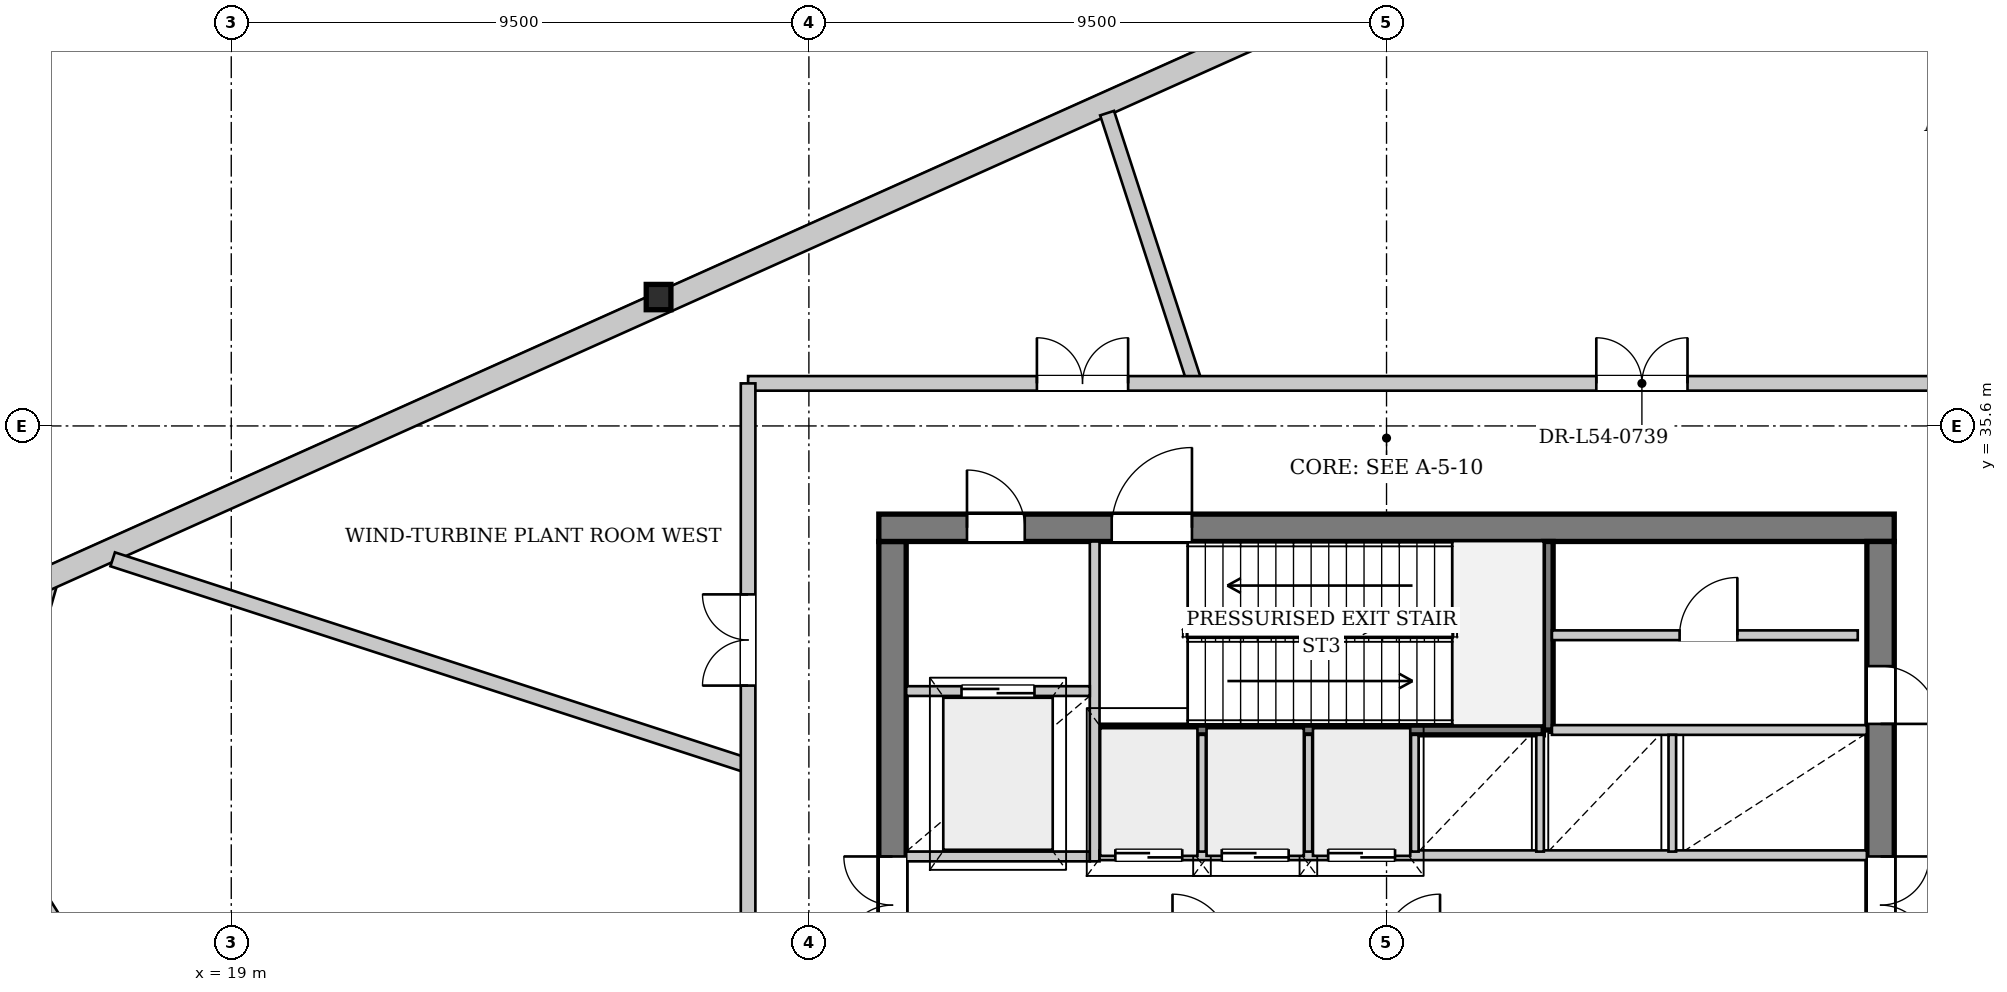
"""IFC4 building model, lengths in metres.
Left out: names, types, materials, properties, quantities, classifications, styles, units other than length and angle.
Written with IfcOpenShell. Run it as: python <this file> out.ifc"""

import sys

from ifc_helpers import new_model, si_unit, direction, frame, frame_2d, origin, origin_2d, place, context, subcontext, project, spatial, rectangle, i_section, extrude, source, transform, mapped, element, fill, save


model = new_model("IFC4")
c1 = context("Model", 3, precision=1e-05, world=origin(), true_north=direction((0.0, 1.0)))
c2 = subcontext(c1, "Body", "Model", "MODEL_VIEW")
j1 = project(units=[si_unit("LENGTHUNIT", "METRE"), si_unit("PLANEANGLEUNIT", "RADIAN")], contexts=[c1])
p1 = place(None, origin())
s1 = spatial("IfcSite", under=j1, at=p1, CompositionType="ELEMENT")
p2 = place(p1, origin())
s2 = spatial("IfcBuilding", under=s1, at=p2, CompositionType="ELEMENT")
p3 = place(p2, frame((0.0, 0.0, 204.3)))
s3 = spatial("IfcBuildingStorey", under=s2, at=p3, CompositionType="ELEMENT", Elevation=204.3)
m1 = source(origin(), c2, "Body", "SweptSolid", [
    extrude(i_section(OverallWidth=0.406, OverallDepth=0.416, WebThickness=0.027, FlangeThickness=0.042, at=origin_2d()), origin(), (0.0, 0.0, 1.0), 5.143),
])
p4 = place(p3, frame((26.104, 37.842, 0.0), z_axis=(-0.0297632018, -0.047659098256, 0.998420133096), x_axis=(0.848188094291, -0.529695154502, 0.0)))
e1 = element("IfcColumn", 1, at=p4, inside=s3, PredefinedType="COLUMN", context=c2, shape_type="MappedRepresentation", body=[
    mapped(m1, transform((0.0, 0.0, 0.0), x_axis=(1.0, 0.0, 0.0), y_axis=(0.0, 1.0, 0.0), z_axis=(0.0, 0.0, 1.0), scale=1.0)),
])
p5 = place(p3, frame((24.242, 14.344, 0.0), z_axis=(0.0, 0.0, 1.0), x_axis=(-0.531419317525, 0.847108912101, 0.0)))
e2 = element("IfcWall", 2, at=p5, inside=s3, PredefinedType="SOLIDWALL", context=c2, shape_type="SweptSolid", body=[
    extrude(rectangle(XDim=17.712, YDim=0.38, at=frame_2d((8.856, 0.0))), origin(), (0.0, 0.0, 1.0), 4.572),
])
p6 = place(p3, frame((14.851, 29.194, 0.0), z_axis=(0.0, 0.0, 1.0), x_axis=(0.27564088165, 0.961260684915, 0.0)))
e3 = element("IfcWall", 3, at=p6, inside=s3, PredefinedType="SOLIDWALL", context=c2, shape_type="SweptSolid", body=[
    extrude(rectangle(XDim=4.136, YDim=0.38, at=frame_2d((2.068, 0.0))), origin(), (0.0, 0.0, 1.0), 4.572),
])
p7 = place(p3, frame((15.886, 33.05, 0.0), z_axis=(0.0, 0.0, 1.0), x_axis=(0.912383830261, 0.409335737845, 0.0)))
e4 = element("IfcWall", 4, at=p7, inside=s3, PredefinedType="SOLIDWALL", context=c2, shape_type="SweptSolid", body=[
    extrude(rectangle(XDim=22.569, YDim=0.38, at=frame_2d((11.284, 0.0))), origin(), (0.0, 0.0, 1.0), 4.572),
])
p8 = place(p3, frame((29.875, 19.5, 0.0), z_axis=(0.0, 0.0, 1.0), x_axis=(0.0, 1.0, 0.0)))
e5 = element("IfcWall", 5, at=p8, inside=s3, PredefinedType="SHEAR", context=c2, shape_type="SweptSolid", body=[
    extrude(rectangle(XDim=14.2, YDim=0.45, at=frame_2d((7.1, 0.0))), origin(), (0.0, 0.0, 1.0), 5.08),
])
p9 = place(p8, frame((7.42, 0.0, 0.0)))
e6 = element("IfcOpeningElement", 6, at=p9, cuts=e5, PredefinedType="OPENING", context=c2, shape_type="SweptSolid", body=[
    extrude(rectangle(XDim=1.6, YDim=2.2, at=frame_2d((0.8, 1.1))), frame((0.0, 0.235, 0.0), z_axis=(0.0, -1.0, 0.0), x_axis=(1.0, 0.0, 0.0)), (0.0, 0.0, 1.0), 0.47),
])
p10 = place(p3, frame((29.65, 33.925, 0.0), z_axis=(0.0, 0.0, 1.0), x_axis=(1.0, 0.0, 0.0)))
e7 = element("IfcWall", 7, at=p10, inside=s3, PredefinedType="SHEAR", context=c2, shape_type="SweptSolid", body=[
    extrude(rectangle(XDim=16.7, YDim=0.45, at=frame_2d((8.35, 0.0))), origin(), (0.0, 0.0, 1.0), 5.08),
])
p11 = place(p10, frame((1.45, 0.0, 0.0)))
e8 = element("IfcOpeningElement", 8, at=p11, cuts=e7, PredefinedType="OPENING", context=c2, shape_type="SweptSolid", body=[
    extrude(rectangle(XDim=0.95, YDim=2.1, at=frame_2d((0.475, 1.05))), frame((0.0, 0.235, 0.0), z_axis=(0.0, -1.0, 0.0), x_axis=(1.0, 0.0, 0.0)), (0.0, 0.0, 1.0), 0.47),
])
p12 = place(p10, frame((3.83, 0.0, 0.0)))
e9 = element("IfcOpeningElement", 9, at=p12, cuts=e7, PredefinedType="OPENING", context=c2, shape_type="SweptSolid", body=[
    extrude(rectangle(XDim=1.32, YDim=2.2, at=frame_2d((0.66, 1.1))), frame((0.0, 0.235, 0.0), z_axis=(0.0, -1.0, 0.0), x_axis=(1.0, 0.0, 0.0)), (0.0, 0.0, 1.0), 0.47),
])
p13 = place(p3, frame((46.125, 33.7, 0.0), z_axis=(0.0, 0.0, 1.0), x_axis=(0.0, -1.0, 0.0)))
e10 = element("IfcWall", 10, at=p13, inside=s3, PredefinedType="SHEAR", context=c2, shape_type="SweptSolid", body=[
    extrude(rectangle(XDim=14.2, YDim=0.45, at=frame_2d((7.1, 0.0))), origin(), (0.0, 0.0, 1.0), 5.08),
])
p14 = place(p13, frame((5.18, 0.0, 0.0)))
e11 = element("IfcOpeningElement", 11, at=p14, cuts=e10, PredefinedType="OPENING", context=c2, shape_type="SweptSolid", body=[
    extrude(rectangle(XDim=1.6, YDim=2.2, at=frame_2d((0.8, 1.1))), frame((0.0, 0.235, 0.0), z_axis=(0.0, -1.0, 0.0), x_axis=(1.0, 0.0, 0.0)), (0.0, 0.0, 1.0), 0.47),
])
p15 = place(p13, frame((2.05, 0.0, 0.0)))
e12 = element("IfcOpeningElement", 12, at=p15, cuts=e10, PredefinedType="OPENING", context=c2, shape_type="SweptSolid", body=[
    extrude(rectangle(XDim=0.95, YDim=2.1, at=frame_2d((0.475, 1.05))), frame((0.0, 0.235, 0.0), z_axis=(0.0, -1.0, 0.0), x_axis=(1.0, 0.0, 0.0)), (0.0, 0.0, 1.0), 0.47),
])
p16 = place(p3, frame((33.28, 30.6, 0.0), z_axis=(0.0, 0.0, 1.0), x_axis=(1.0, 0.0, 0.0)))
e13 = element("IfcWall", 13, at=p16, inside=s3, PredefinedType="PARTITIONING", context=c2, shape_type="SweptSolid", body=[
    extrude(rectangle(XDim=7.3, YDim=0.16, at=frame_2d((3.65, 0.0))), origin(), (0.0, 0.0, 1.0), 5.08),
])
p17 = place(p3, frame((40.66, 30.6, 0.0), z_axis=(0.0, 0.0, 1.0), x_axis=(0.0, 1.0, 0.0)))
e14 = element("IfcWall", 14, at=p17, inside=s3, PredefinedType="PARTITIONING", context=c2, shape_type="SweptSolid", body=[
    extrude(rectangle(XDim=3.1, YDim=0.16, at=frame_2d((1.55, 0.0))), origin(), (0.0, 0.0, 1.0), 5.08),
])
p18 = place(p3, frame((30.1, 28.52, 0.0), z_axis=(0.0, 0.0, 1.0), x_axis=(1.0, 0.0, 0.0)))
e15 = element("IfcWall", 15, at=p18, inside=s3, PredefinedType="PARTITIONING", context=c2, shape_type="SweptSolid", body=[
    extrude(rectangle(XDim=3.02, YDim=0.16, at=frame_2d((1.51, 0.0))), origin(), (0.0, 0.0, 1.0), 5.08),
])
p19 = place(p3, frame((33.2, 28.44, 0.0), z_axis=(0.0, 0.0, 1.0), x_axis=(0.0, 1.0, 0.0)))
e16 = element("IfcWall", 16, at=p19, inside=s3, PredefinedType="PARTITIONING", context=c2, shape_type="SweptSolid", body=[
    extrude(rectangle(XDim=5.26, YDim=0.16, at=frame_2d((2.63, 0.0))), origin(), (0.0, 0.0, 1.0), 5.08),
])
p20 = place(p3, frame((30.1, 31.24, 0.0), z_axis=(0.0, 0.0, 1.0), x_axis=(1.0, 0.0, 0.0)))
e17 = element("IfcWall", 17, at=p20, inside=s3, PredefinedType="PARTITIONING", context=c2, shape_type="SweptSolid", body=[
    extrude(rectangle(XDim=3.02, YDim=0.16, at=frame_2d((1.51, 0.0))), origin(), (0.0, 0.0, 1.0), 5.08),
])
p21 = place(p20, frame((0.91, 0.0, 0.0)))
e18 = element("IfcOpeningElement", 18, at=p21, cuts=e17, PredefinedType="OPENING", context=c2, shape_type="SweptSolid", body=[
    extrude(rectangle(XDim=1.2, YDim=2.2, at=frame_2d((0.6, 1.1))), frame((0.0, 0.09, 0.0), z_axis=(0.0, -1.0, 0.0), x_axis=(1.0, 0.0, 0.0)), (0.0, 0.0, 1.0), 0.18),
])
p22 = place(p3, frame((33.28, 28.54, 0.0), z_axis=(0.0, 0.0, 1.0), x_axis=(1.0, 0.0, 0.0)))
e19 = element("IfcWall", 19, at=p22, inside=s3, PredefinedType="PARTITIONING", context=c2, shape_type="SweptSolid", body=[
    extrude(rectangle(XDim=12.62, YDim=0.16, at=frame_2d((6.31, 0.0))), origin(), (0.0, 0.0, 1.0), 5.08),
])
p23 = place(p22, frame((0.26, 0.0, 0.0)))
e20 = element("IfcOpeningElement", 20, at=p23, cuts=e19, PredefinedType="OPENING", context=c2, shape_type="SweptSolid", body=[
    extrude(rectangle(XDim=1.1, YDim=2.2, at=frame_2d((0.55, 1.1))), frame((0.0, 0.09, 0.0), z_axis=(0.0, -1.0, 0.0), x_axis=(1.0, 0.0, 0.0)), (0.0, 0.0, 1.0), 0.18),
])
p24 = place(p22, frame((2.01, 0.0, 0.0)))
e21 = element("IfcOpeningElement", 21, at=p24, cuts=e19, PredefinedType="OPENING", context=c2, shape_type="SweptSolid", body=[
    extrude(rectangle(XDim=1.1, YDim=2.2, at=frame_2d((0.55, 1.1))), frame((0.0, 0.09, 0.0), z_axis=(0.0, -1.0, 0.0), x_axis=(1.0, 0.0, 0.0)), (0.0, 0.0, 1.0), 0.18),
])
p25 = place(p22, frame((3.76, 0.0, 0.0)))
e22 = element("IfcOpeningElement", 22, at=p25, cuts=e19, PredefinedType="OPENING", context=c2, shape_type="SweptSolid", body=[
    extrude(rectangle(XDim=1.1, YDim=2.2, at=frame_2d((0.55, 1.1))), frame((0.0, 0.09, 0.0), z_axis=(0.0, -1.0, 0.0), x_axis=(1.0, 0.0, 0.0)), (0.0, 0.0, 1.0), 0.18),
])
p26 = place(p3, frame((40.72, 30.6, 0.0), z_axis=(0.0, 0.0, 1.0), x_axis=(1.0, 0.0, 0.0)))
e23 = element("IfcWall", 23, at=p26, inside=s3, PredefinedType="PARTITIONING", context=c2, shape_type="SweptSolid", body=[
    extrude(rectangle(XDim=5.18, YDim=0.16, at=frame_2d((2.59, 0.0))), origin(), (0.0, 0.0, 1.0), 5.08),
])
for number, where, z_axis, x_axis in (
    (24, (34.965, 28.6, 0.0), (0.0, 0.0, 1.0), (0.0, 1.0, 0.0)),
    (25, (36.715, 28.6, 0.0), (0.0, 0.0, 1.0), (0.0, 1.0, 0.0)),
    (26, (38.465, 28.6, 0.0), (0.0, 0.0, 1.0), (0.0, 1.0, 0.0)),
    (27, (40.525, 28.6, 0.0), (0.0, 0.0, 1.0), (0.0, 1.0, 0.0)),
    (28, (42.7, 28.6, 0.0), (0.0, 0.0, 1.0), (0.0, 1.0, 0.0)),
):
    element("IfcWall", number, at=place(p3, frame(where, z_axis=z_axis, x_axis=x_axis)), inside=s3, PredefinedType="PARTITIONING", context=c2, shape_type="SweptSolid", body=[
        extrude(rectangle(XDim=1.92, YDim=0.125, at=frame_2d((0.96, 0.0))), origin(), (0.0, 0.0, 1.0), 5.08),
    ])
p27 = place(p3, frame((40.72, 32.158, 0.0), z_axis=(0.0, 0.0, 1.0), x_axis=(1.0, 0.0, 0.0)))
e29 = element("IfcWall", 29, at=p27, inside=s3, PredefinedType="PARTITIONING", context=c2, shape_type="SweptSolid", body=[
    extrude(rectangle(XDim=5.03, YDim=0.16, at=frame_2d((2.515, 0.0))), origin(), (0.0, 0.0, 1.0), 5.08),
])
p28 = place(p27, frame((2.1, 0.0, 0.0)))
e30 = element("IfcOpeningElement", 30, at=p28, cuts=e29, PredefinedType="OPENING", context=c2, shape_type="SweptSolid", body=[
    extrude(rectangle(XDim=0.95, YDim=2.1, at=frame_2d((0.475, 1.05))), frame((0.0, 0.09, 0.0), z_axis=(0.0, -1.0, 0.0), x_axis=(1.0, 0.0, 0.0)), (0.0, 0.0, 1.0), 0.18),
])
p29 = place(p3, frame((34.848, 36.3, 0.0), z_axis=(0.0, 0.0, 1.0), x_axis=(-0.309024642633, 0.951054031191, 0.0)))
e31 = element("IfcWall", 31, at=p29, inside=s3, PredefinedType="PARTITIONING", context=c2, shape_type="SweptSolid", body=[
    extrude(rectangle(XDim=4.673, YDim=0.24, at=frame_2d((2.336, 0.0))), origin(), (0.0, 0.0, 1.0), 5.08),
])
p30 = place(p3, frame((27.5, 30.012, 0.0), z_axis=(0.0, 0.0, 1.0), x_axis=(-0.951062149422, 0.308999656855, 0.0)))
e32 = element("IfcWall", 32, at=p30, inside=s3, PredefinedType="PARTITIONING", context=c2, shape_type="SweptSolid", body=[
    extrude(rectangle(XDim=10.988, YDim=0.24, at=frame_2d((5.494, 0.0))), origin(), (0.0, 0.0, 1.0), 5.08),
])
p31 = place(p3, frame((27.5, 36.3, 0.0), z_axis=(0.0, 0.0, 1.0), x_axis=(1.0, 0.0, 0.0)))
e33 = element("IfcWall", 33, at=p31, inside=s3, PredefinedType="PARTITIONING", context=c2, shape_type="SweptSolid", body=[
    extrude(rectangle(XDim=21.0, YDim=0.24, at=frame_2d((10.5, 0.0))), origin(), (0.0, 0.0, 1.0), 5.08),
])
p32 = place(p31, frame((4.75, 0.0, 0.0)))
e34 = element("IfcOpeningElement", 34, at=p32, cuts=e33, PredefinedType="OPENING", context=c2, shape_type="SweptSolid", body=[
    extrude(rectangle(XDim=1.5, YDim=2.25, at=frame_2d((0.75, 1.125))), frame((0.0, 0.13, 0.0), z_axis=(0.0, -1.0, 0.0), x_axis=(1.0, 0.0, 0.0)), (0.0, 0.0, 1.0), 0.26),
])
p33 = place(p31, frame((13.95, 0.0, 0.0)))
e35 = element("IfcOpeningElement", 35, at=p33, cuts=e33, PredefinedType="OPENING", context=c2, shape_type="SweptSolid", body=[
    extrude(rectangle(XDim=1.5, YDim=2.25, at=frame_2d((0.75, 1.125))), frame((0.0, 0.13, 0.0), z_axis=(0.0, -1.0, 0.0), x_axis=(1.0, 0.0, 0.0)), (0.0, 0.0, 1.0), 0.26),
])
p34 = place(p3, frame((27.5, 16.9, 0.0), z_axis=(0.0, 0.0, 1.0), x_axis=(0.0, 1.0, 0.0)))
e36 = element("IfcWall", 36, at=p34, inside=s3, PredefinedType="PARTITIONING", context=c2, shape_type="SweptSolid", body=[
    extrude(rectangle(XDim=19.4, YDim=0.24, at=frame_2d((9.7, 0.0))), origin(), (0.0, 0.0, 1.0), 5.08),
])
p35 = place(p34, frame((5.07, 0.0, 0.0)))
e37 = element("IfcOpeningElement", 37, at=p35, cuts=e36, PredefinedType="OPENING", context=c2, shape_type="SweptSolid", body=[
    extrude(rectangle(XDim=1.5, YDim=2.25, at=frame_2d((0.75, 1.125))), frame((0.0, 0.13, 0.0), z_axis=(0.0, -1.0, 0.0), x_axis=(1.0, 0.0, 0.0)), (0.0, 0.0, 1.0), 0.26),
])
p36 = place(p34, frame((14.43, 0.0, 0.0)))
e38 = element("IfcOpeningElement", 38, at=p36, cuts=e36, PredefinedType="OPENING", context=c2, shape_type="SweptSolid", body=[
    extrude(rectangle(XDim=1.5, YDim=2.25, at=frame_2d((0.75, 1.125))), frame((0.0, 0.13, 0.0), z_axis=(0.0, -1.0, 0.0), x_axis=(1.0, 0.0, 0.0)), (0.0, 0.0, 1.0), 0.26),
])
m2 = source(origin(), c2, "Body", "SweptSolid", [
    extrude(rectangle(XDim=1.6, YDim=2.2, at=frame_2d((0.8, 1.1))), frame((0.0, 0.025, 0.0), z_axis=(0.0, -1.0, 0.0), x_axis=(1.0, 0.0, 0.0)), (0.0, 0.0, 1.0), 0.05),
])
p37 = place(p9, origin())
e39 = element("IfcDoor", 39, at=p37, inside=s3, OperationType="DOUBLE_DOOR_SINGLE_SWING", PredefinedType="DOOR", context=c2, shape_type="MappedRepresentation", body=[
    mapped(m2, transform((0.0, 0.0, 0.0), x_axis=(1.0, 0.0, 0.0), y_axis=(0.0, 1.0, 0.0), z_axis=(0.0, 0.0, 1.0), scale=1.0)),
])
fill(e6, e39)
m3 = source(origin(), c2, "Body", "SweptSolid", [
    extrude(rectangle(XDim=0.95, YDim=2.1, at=frame_2d((0.475, 1.05))), frame((0.0, 0.025, 0.0), z_axis=(0.0, -1.0, 0.0), x_axis=(1.0, 0.0, 0.0)), (0.0, 0.0, 1.0), 0.05),
])
p38 = place(p11, origin())
e40 = element("IfcDoor", 40, at=p38, inside=s3, OperationType="SINGLE_SWING_LEFT", PredefinedType="DOOR", context=c2, shape_type="MappedRepresentation", body=[
    mapped(m3, transform((0.0, 0.0, 0.0), x_axis=(1.0, 0.0, 0.0), y_axis=(0.0, 1.0, 0.0), z_axis=(0.0, 0.0, 1.0), scale=1.0)),
])
fill(e8, e40)
m4 = source(origin(), c2, "Body", "SweptSolid", [
    extrude(rectangle(XDim=1.32, YDim=2.2, at=frame_2d((0.66, 1.1))), frame((0.0, 0.025, 0.0), z_axis=(0.0, -1.0, 0.0), x_axis=(1.0, 0.0, 0.0)), (0.0, 0.0, 1.0), 0.05),
])
p39 = place(p12, origin())
e41 = element("IfcDoor", 41, at=p39, inside=s3, OperationType="SINGLE_SWING_RIGHT", PredefinedType="DOOR", context=c2, shape_type="MappedRepresentation", body=[
    mapped(m4, transform((0.0, 0.0, 0.0), x_axis=(1.0, 0.0, 0.0), y_axis=(0.0, 1.0, 0.0), z_axis=(0.0, 0.0, 1.0), scale=1.0)),
])
fill(e9, e41)
p40 = place(p14, origin())
e42 = element("IfcDoor", 42, at=p40, inside=s3, OperationType="DOUBLE_DOOR_SINGLE_SWING", PredefinedType="DOOR", context=c2, shape_type="MappedRepresentation", body=[
    mapped(m2, transform((0.0, 0.0, 0.0), x_axis=(1.0, 0.0, 0.0), y_axis=(0.0, 1.0, 0.0), z_axis=(0.0, 0.0, 1.0), scale=1.0)),
])
fill(e11, e42)
m5 = source(origin(), c2, "Body", "SweptSolid", [
    extrude(rectangle(XDim=1.2, YDim=2.2, at=frame_2d((0.6, 1.1))), frame((0.0, 0.025, 0.0), z_axis=(0.0, -1.0, 0.0), x_axis=(1.0, 0.0, 0.0)), (0.0, 0.0, 1.0), 0.05),
])
p41 = place(p21, origin())
e43 = element("IfcDoor", 43, at=p41, inside=s3, OperationType="DOUBLE_DOOR_SLIDING", PredefinedType="DOOR", context=c2, shape_type="MappedRepresentation", body=[
    mapped(m5, transform((0.0, 0.0, 0.0), x_axis=(1.0, 0.0, 0.0), y_axis=(0.0, 1.0, 0.0), z_axis=(0.0, 0.0, 1.0), scale=1.0)),
])
fill(e18, e43)
m6 = source(origin(), c2, "Body", "SweptSolid", [
    extrude(rectangle(XDim=1.1, YDim=2.2, at=frame_2d((0.55, 1.1))), frame((0.0, 0.025, 0.0), z_axis=(0.0, -1.0, 0.0), x_axis=(1.0, 0.0, 0.0)), (0.0, 0.0, 1.0), 0.05),
])
p42 = place(p23, origin())
e44 = element("IfcDoor", 44, at=p42, inside=s3, OperationType="DOUBLE_DOOR_SLIDING", PredefinedType="DOOR", context=c2, shape_type="MappedRepresentation", body=[
    mapped(m6, transform((0.0, 0.0, 0.0), x_axis=(1.0, 0.0, 0.0), y_axis=(0.0, 1.0, 0.0), z_axis=(0.0, 0.0, 1.0), scale=1.0)),
])
fill(e20, e44)
p43 = place(p24, origin())
e45 = element("IfcDoor", 45, at=p43, inside=s3, OperationType="DOUBLE_DOOR_SLIDING", PredefinedType="DOOR", context=c2, shape_type="MappedRepresentation", body=[
    mapped(m6, transform((0.0, 0.0, 0.0), x_axis=(1.0, 0.0, 0.0), y_axis=(0.0, 1.0, 0.0), z_axis=(0.0, 0.0, 1.0), scale=1.0)),
])
fill(e21, e45)
p44 = place(p25, origin())
e46 = element("IfcDoor", 46, at=p44, inside=s3, OperationType="DOUBLE_DOOR_SLIDING", PredefinedType="DOOR", context=c2, shape_type="MappedRepresentation", body=[
    mapped(m6, transform((0.0, 0.0, 0.0), x_axis=(1.0, 0.0, 0.0), y_axis=(0.0, 1.0, 0.0), z_axis=(0.0, 0.0, 1.0), scale=1.0)),
])
fill(e22, e46)
p45 = place(p28, origin())
e47 = element("IfcDoor", 47, at=p45, inside=s3, OperationType="SINGLE_SWING_RIGHT", PredefinedType="DOOR", context=c2, shape_type="MappedRepresentation", body=[
    mapped(m3, transform((0.0, 0.0, 0.0), x_axis=(1.0, 0.0, 0.0), y_axis=(0.0, 1.0, 0.0), z_axis=(0.0, 0.0, 1.0), scale=1.0)),
])
fill(e30, e47)
p46 = place(p15, origin())
e48 = element("IfcDoor", 48, at=p46, inside=s3, OperationType="SINGLE_SWING_RIGHT", PredefinedType="DOOR", context=c2, shape_type="MappedRepresentation", body=[
    mapped(m3, transform((0.0, 0.0, 0.0), x_axis=(1.0, 0.0, 0.0), y_axis=(0.0, 1.0, 0.0), z_axis=(0.0, 0.0, 1.0), scale=1.0)),
])
fill(e12, e48)
m7 = source(origin(), c2, "Body", "SweptSolid", [
    extrude(rectangle(XDim=1.5, YDim=2.25, at=frame_2d((0.75, 1.125))), frame((0.0, 0.025, 0.0), z_axis=(0.0, -1.0, 0.0), x_axis=(1.0, 0.0, 0.0)), (0.0, 0.0, 1.0), 0.05),
])
p47 = place(p32, origin())
e49 = element("IfcDoor", 49, at=p47, inside=s3, OperationType="DOUBLE_DOOR_SINGLE_SWING", PredefinedType="DOOR", context=c2, shape_type="MappedRepresentation", body=[
    mapped(m7, transform((0.0, 0.0, 0.0), x_axis=(1.0, 0.0, 0.0), y_axis=(0.0, 1.0, 0.0), z_axis=(0.0, 0.0, 1.0), scale=1.0)),
])
fill(e34, e49)
p48 = place(p33, origin())
e50 = element("IfcDoor", 50, at=p48, inside=s3, OperationType="DOUBLE_DOOR_SINGLE_SWING", PredefinedType="DOOR", context=c2, shape_type="MappedRepresentation", body=[
    mapped(m7, transform((0.0, 0.0, 0.0), x_axis=(1.0, 0.0, 0.0), y_axis=(0.0, 1.0, 0.0), z_axis=(0.0, 0.0, 1.0), scale=1.0)),
])
fill(e35, e50)
p49 = place(p36, origin())
e51 = element("IfcDoor", 51, at=p49, inside=s3, OperationType="DOUBLE_DOOR_SINGLE_SWING", PredefinedType="DOOR", context=c2, shape_type="MappedRepresentation", body=[
    mapped(m7, transform((0.0, 0.0, 0.0), x_axis=(1.0, 0.0, 0.0), y_axis=(0.0, 1.0, 0.0), z_axis=(0.0, 0.0, 1.0), scale=1.0)),
])
fill(e38, e51)
save(model, sys.argv[1])
